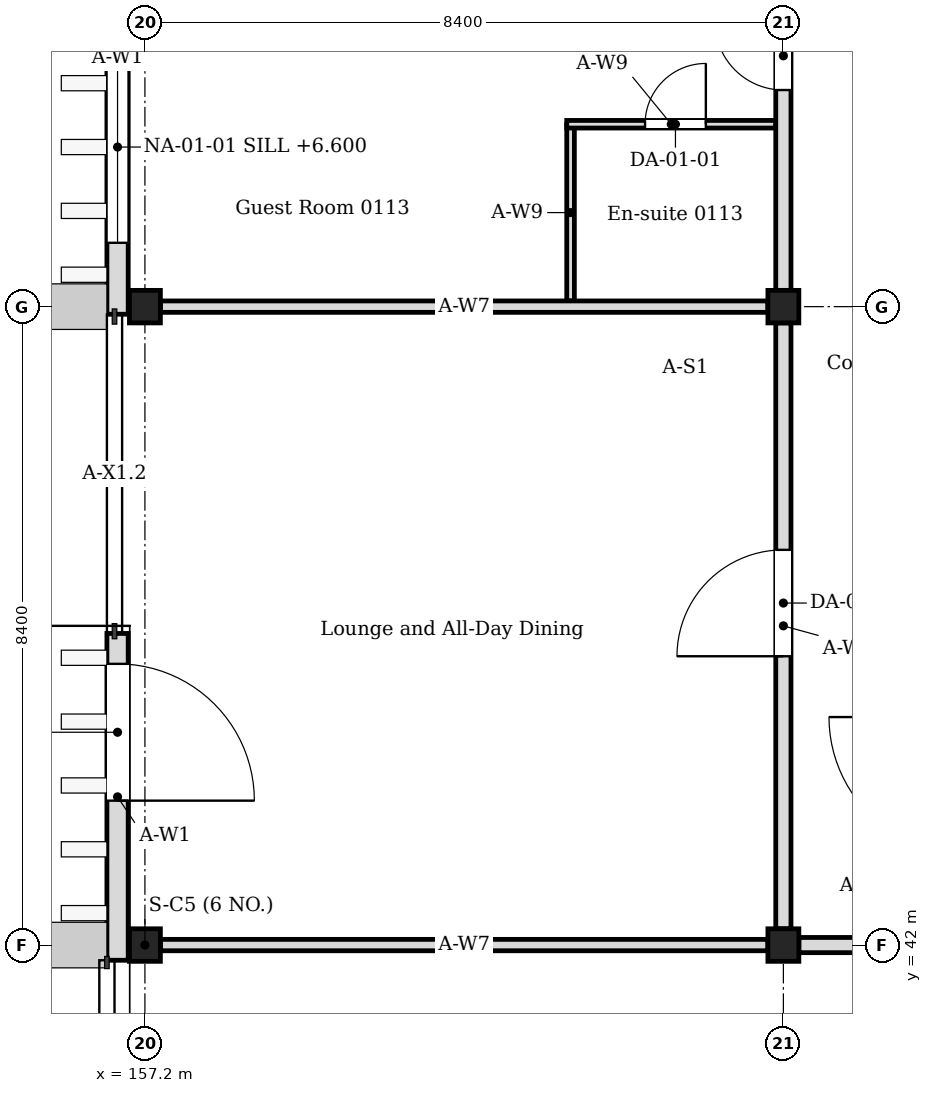
"""IFC4 building model, lengths in metres.
Left out: names, types, materials, properties, quantities, classifications, styles, units other than length and angle.
Written with IfcOpenShell. Run it as: python <this file> out.ifc"""

import sys

from ifc_helpers import new_model, si_unit, direction, frame, frame_2d, origin, origin_2d, place, context, subcontext, project, spatial, rectangle, i_section, extrude, element, fill, save


model = new_model("IFC4")
c1 = context("Model", 3, precision=1e-05, world=origin(), true_north=direction((0.0, 1.0)))
c2 = subcontext(c1, "Body", "Model", "MODEL_VIEW")
j1 = project(units=[si_unit("LENGTHUNIT", "METRE"), si_unit("PLANEANGLEUNIT", "RADIAN")], contexts=[c1])
p1 = place(None, origin())
s1 = spatial("IfcSite", under=j1, at=p1, CompositionType="ELEMENT")
p2 = place(p1, origin())
s2 = spatial("IfcBuilding", under=s1, at=p2, CompositionType="ELEMENT")
p3 = place(p2, frame((0.0, 0.0, 6.0)))
s3 = spatial("IfcBuildingStorey", under=s2, at=p3, CompositionType="ELEMENT", Elevation=6.0)
for number, where, z_axis, x_axis in (
    (1, (157.2, 42.0, 0.0), (0.0, 0.0, 1.0), (1.0, 0.0, 0.0)),
    (2, (157.2, 50.4, 0.0), (0.0, 0.0, 1.0), (1.0, 0.0, 0.0)),
    (3, (165.6, 42.0, 0.0), (0.0, 0.0, 1.0), (1.0, 0.0, 0.0)),
    (4, (165.6, 50.4, 0.0), (0.0, 0.0, 1.0), (1.0, 0.0, 0.0)),
):
    element("IfcColumn", number, at=place(p3, frame(where, z_axis=z_axis, x_axis=x_axis)), inside=s3, PredefinedType="COLUMN", context=c2, shape_type="SweptSolid", body=[
        extrude(i_section(OverallWidth=0.407, OverallDepth=0.428, WebThickness=0.02, FlangeThickness=0.035, FilletRadius=0.022, at=origin_2d()), origin(), (0.0, 0.0, 1.0), 4.2),
    ])
p4 = place(p3, frame((156.84, 50.3, 0.0), z_axis=(0.0, 0.0, 1.0), x_axis=(0.0, 1.0, 0.0)))
e5 = element("IfcWall", 5, at=p4, inside=s3, PredefinedType="SOLIDWALL", context=c2, shape_type="SweptSolid", body=[
    extrude(rectangle(XDim=17.12, YDim=0.28, at=frame_2d((8.56, 0.0))), origin(), (0.0, 0.0, 1.0), 4.05),
])
p5 = place(p4, frame((0.94, 0.0, 0.6)))
e6 = element("IfcOpeningElement", 6, at=p5, cuts=e5, PredefinedType="OPENING", context=c2, shape_type="SweptSolid", body=[
    extrude(rectangle(XDim=2.52, YDim=2.4, at=frame_2d((1.26, 1.2))), frame((0.0, 0.15, 0.0), z_axis=(0.0, -1.0, 0.0), x_axis=(1.0, 0.0, 0.0)), (0.0, 0.0, 1.0), 0.3),
])
p6 = place(p4, frame((5.14, 0.0, 0.6)))
e7 = element("IfcOpeningElement", 7, at=p6, cuts=e5, PredefinedType="OPENING", context=c2, shape_type="SweptSolid", body=[
    extrude(rectangle(XDim=2.52, YDim=2.4, at=frame_2d((1.26, 1.2))), frame((0.0, 0.15, 0.0), z_axis=(0.0, -1.0, 0.0), x_axis=(1.0, 0.0, 0.0)), (0.0, 0.0, 1.0), 0.3),
])
p7 = place(p4, frame((8.92, 0.0, 0.6)))
e8 = element("IfcOpeningElement", 8, at=p7, cuts=e5, PredefinedType="OPENING", context=c2, shape_type="SweptSolid", body=[
    extrude(rectangle(XDim=2.52, YDim=2.4, at=frame_2d((1.26, 1.2))), frame((0.0, 0.15, 0.0), z_axis=(0.0, -1.0, 0.0), x_axis=(1.0, 0.0, 0.0)), (0.0, 0.0, 1.0), 0.3),
])
p8 = place(p4, frame((13.12, 0.0, 0.6)))
e9 = element("IfcOpeningElement", 9, at=p8, cuts=e5, PredefinedType="OPENING", context=c2, shape_type="SweptSolid", body=[
    extrude(rectangle(XDim=2.52, YDim=2.4, at=frame_2d((1.26, 1.2))), frame((0.0, 0.15, 0.0), z_axis=(0.0, -1.0, 0.0), x_axis=(1.0, 0.0, 0.0)), (0.0, 0.0, 1.0), 0.3),
])
p9 = place(p3, frame((156.84, 41.8, 0.0), z_axis=(0.0, 0.0, 1.0), x_axis=(0.0, 1.0, 0.0)))
e10 = element("IfcWall", 10, at=p9, inside=s3, PredefinedType="SOLIDWALL", context=c2, shape_type="SweptSolid", body=[
    extrude(rectangle(XDim=4.3, YDim=0.28, at=frame_2d((2.15, 0.0))), origin(), (0.0, 0.0, 1.0), 4.05),
])
p10 = place(p9, frame((2.1, 0.0, 0.0)))
e11 = element("IfcOpeningElement", 11, at=p10, cuts=e10, PredefinedType="OPENING", context=c2, shape_type="SweptSolid", body=[
    extrude(rectangle(XDim=1.8, YDim=2.1, at=frame_2d((0.9, 1.05))), frame((0.0, 0.15, 0.0), z_axis=(0.0, -1.0, 0.0), x_axis=(1.0, 0.0, 0.0)), (0.0, 0.0, 1.0), 0.3),
])
p11 = place(p3, frame((162.8, 50.475, 0.0), z_axis=(0.0, 0.0, 1.0), x_axis=(0.0, 1.0, 0.0)))
e12 = element("IfcWall", 12, at=p11, inside=s3, PredefinedType="PARTITIONING", context=c2, shape_type="SweptSolid", body=[
    extrude(rectangle(XDim=2.325, YDim=0.1, at=frame_2d((1.163, 0.0))), origin(), (0.0, 0.0, 1.0), 4.05),
])
p12 = place(p3, frame((162.75, 52.8, 0.0), z_axis=(0.0, 0.0, 1.0), x_axis=(1.0, 0.0, 0.0)))
e13 = element("IfcWall", 13, at=p12, inside=s3, PredefinedType="PARTITIONING", context=c2, shape_type="SweptSolid", body=[
    extrude(rectangle(XDim=2.75, YDim=0.1, at=frame_2d((1.375, 0.0))), origin(), (0.0, 0.0, 1.0), 4.05),
])
p13 = place(p12, frame((1.03, 0.0, 0.0)))
e14 = element("IfcOpeningElement", 14, at=p13, cuts=e13, PredefinedType="OPENING", context=c2, shape_type="SweptSolid", body=[
    extrude(rectangle(XDim=0.8, YDim=2.1, at=frame_2d((0.4, 1.05))), frame((0.0, 0.06, 0.0), z_axis=(0.0, -1.0, 0.0), x_axis=(1.0, 0.0, 0.0)), (0.0, 0.0, 1.0), 0.12),
])
for number, where, z_axis, x_axis in (
    (15, (157.404, 50.4, 0.0), (0.0, 0.0, 1.0), (1.0, 0.0, 0.0)),
    (16, (157.404, 42.0, 0.0), (0.0, 0.0, 1.0), (1.0, 0.0, 0.0)),
):
    element("IfcWall", number, at=place(p3, frame(where, z_axis=z_axis, x_axis=x_axis)), inside=s3, PredefinedType="PARTITIONING", context=c2, shape_type="SweptSolid", body=[
        extrude(rectangle(XDim=7.993, YDim=0.15, at=frame_2d((3.997, 0.0))), origin(), (0.0, 0.0, 1.0), 3.604),
    ])
p14 = place(p3, frame((165.803, 42.0, 0.0), z_axis=(0.0, 0.0, 1.0), x_axis=(1.0, 0.0, 0.0)))
e17 = element("IfcWall", 17, at=p14, inside=s3, PredefinedType="PARTITIONING", context=c2, shape_type="SweptSolid", body=[
    extrude(rectangle(XDim=1.997, YDim=0.2, at=frame_2d((0.998, 0.0))), origin(), (0.0, 0.0, 1.0), 3.604),
])
p15 = place(p3, frame((165.6, 42.214, 0.0), z_axis=(0.0, 0.0, 1.0), x_axis=(0.0, 1.0, 0.0)))
e18 = element("IfcWall", 18, at=p15, inside=s3, PredefinedType="PARTITIONING", context=c2, shape_type="SweptSolid", body=[
    extrude(rectangle(XDim=7.972, YDim=0.2, at=frame_2d((3.986, 0.0))), origin(), (0.0, 0.0, 1.0), 3.45),
])
p16 = place(p15, frame((3.586, 0.0, 0.0)))
e19 = element("IfcOpeningElement", 19, at=p16, cuts=e18, PredefinedType="OPENING", context=c2, shape_type="SweptSolid", body=[
    extrude(rectangle(XDim=1.4, YDim=2.1, at=frame_2d((0.7, 1.05))), frame((0.0, 0.11, 0.0), z_axis=(0.0, -1.0, 0.0), x_axis=(1.0, 0.0, 0.0)), (0.0, 0.0, 1.0), 0.22),
])
p17 = place(p3, frame((165.6, 50.614, 0.0), z_axis=(0.0, 0.0, 1.0), x_axis=(0.0, 1.0, 0.0)))
e20 = element("IfcWall", 20, at=p17, inside=s3, PredefinedType="PARTITIONING", context=c2, shape_type="SweptSolid", body=[
    extrude(rectangle(XDim=7.972, YDim=0.2, at=frame_2d((3.986, 0.0))), origin(), (0.0, 0.0, 1.0), 3.45),
])
p18 = place(p17, frame((2.636, 0.0, 0.0)))
e21 = element("IfcOpeningElement", 21, at=p18, cuts=e20, PredefinedType="OPENING", context=c2, shape_type="SweptSolid", body=[
    extrude(rectangle(XDim=0.9, YDim=2.1, at=frame_2d((0.45, 1.05))), frame((0.0, 0.11, 0.0), z_axis=(0.0, -1.0, 0.0), x_axis=(1.0, 0.0, 0.0)), (0.0, 0.0, 1.0), 0.22),
])
p19 = place(p17, frame((4.436, 0.0, 0.0)))
e22 = element("IfcOpeningElement", 22, at=p19, cuts=e20, PredefinedType="OPENING", context=c2, shape_type="SweptSolid", body=[
    extrude(rectangle(XDim=0.9, YDim=2.1, at=frame_2d((0.45, 1.05))), frame((0.0, 0.11, 0.0), z_axis=(0.0, -1.0, 0.0), x_axis=(1.0, 0.0, 0.0)), (0.0, 0.0, 1.0), 0.22),
])
p20 = place(p10, origin())
e23 = element("IfcDoor", 23, at=p20, inside=s3, OperationType="DOUBLE_DOOR_DOUBLE_SWING", PredefinedType="DOOR", context=c2, shape_type="SweptSolid", body=[
    extrude(rectangle(XDim=1.8, YDim=2.1, at=frame_2d((0.9, 1.05))), frame((0.0, 0.025, 0.0), z_axis=(0.0, -1.0, 0.0), x_axis=(1.0, 0.0, 0.0)), (0.0, 0.0, 1.0), 0.05),
])
fill(e11, e23)
p21 = place(p5, origin())
e24 = element("IfcWindow", 24, at=p21, inside=s3, PartitioningType="SINGLE_PANEL", PredefinedType="WINDOW", context=c2, shape_type="SweptSolid", body=[
    extrude(rectangle(XDim=2.52, YDim=2.4, at=frame_2d((1.26, 1.2))), frame((0.0, 0.03, 0.0), z_axis=(0.0, -1.0, 0.0), x_axis=(1.0, 0.0, 0.0)), (0.0, 0.0, 1.0), 0.06),
])
fill(e6, e24)
p22 = place(p13, origin())
e25 = element("IfcDoor", 25, at=p22, inside=s3, OperationType="SINGLE_SWING_RIGHT", PredefinedType="DOOR", context=c2, shape_type="SweptSolid", body=[
    extrude(rectangle(XDim=0.8, YDim=2.1, at=frame_2d((0.4, 1.05))), frame((0.0, 0.025, 0.0), z_axis=(0.0, -1.0, 0.0), x_axis=(1.0, 0.0, 0.0)), (0.0, 0.0, 1.0), 0.05),
])
fill(e14, e25)
p23 = place(p18, origin())
e26 = element("IfcDoor", 26, at=p23, inside=s3, OperationType="SINGLE_SWING_RIGHT", PredefinedType="DOOR", context=c2, shape_type="SweptSolid", body=[
    extrude(rectangle(XDim=0.9, YDim=2.1, at=frame_2d((0.45, 1.05))), frame((0.0, 0.025, 0.0), z_axis=(0.0, -1.0, 0.0), x_axis=(1.0, 0.0, 0.0)), (0.0, 0.0, 1.0), 0.05),
])
fill(e21, e26)
p24 = place(p16, origin())
e27 = element("IfcDoor", 27, at=p24, inside=s3, OperationType="DOUBLE_DOOR_DOUBLE_SWING", PredefinedType="DOOR", context=c2, shape_type="SweptSolid", body=[
    extrude(rectangle(XDim=1.4, YDim=2.1, at=frame_2d((0.7, 1.05))), frame((0.0, 0.025, 0.0), z_axis=(0.0, -1.0, 0.0), x_axis=(1.0, 0.0, 0.0)), (0.0, 0.0, 1.0), 0.05),
])
fill(e19, e27)
save(model, sys.argv[1])
